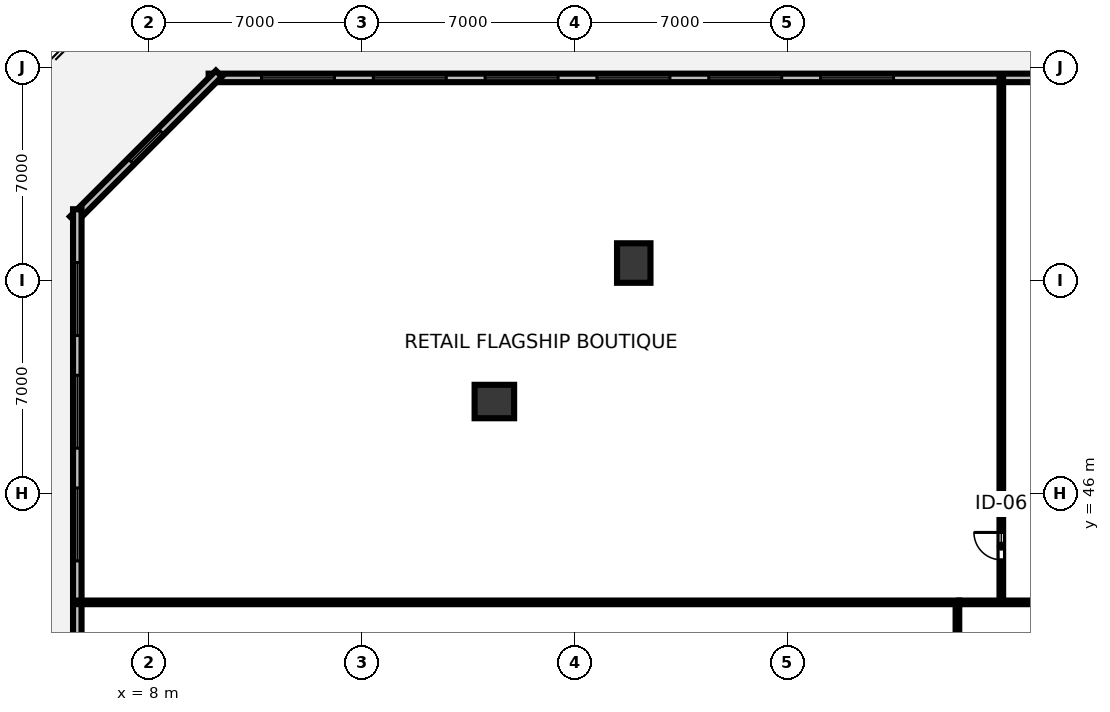
"""IFC4 building model, lengths in metres.
Left out: names, types, materials, properties, quantities, classifications, styles, units other than length and angle.
Written with IfcOpenShell. Run it as: python <this file> out.ifc"""

import sys

from ifc_helpers import new_model, si_unit, direction, frame, frame_2d, origin, origin_2d, place, context, subcontext, project, spatial, rectangle, hollow_rectangle, extrude, element, fill, save


model = new_model("IFC4")
c1 = context("Model", 3, precision=1e-05, world=origin(), true_north=direction((0.0, 1.0)))
c2 = subcontext(c1, "Body", "Model", "MODEL_VIEW")
j1 = project(units=[si_unit("LENGTHUNIT", "METRE"), si_unit("PLANEANGLEUNIT", "RADIAN")], contexts=[c1])
p1 = place(None, origin())
s1 = spatial("IfcSite", under=j1, at=p1, CompositionType="ELEMENT")
p2 = place(p1, origin())
s2 = spatial("IfcBuilding", under=s1, at=p2, CompositionType="ELEMENT")
p3 = place(p2, frame((0.0, 0.0, 5.0)))
s3 = spatial("IfcBuildingStorey", under=s2, at=p3, CompositionType="ELEMENT", Elevation=5.0)
for number, where, z_axis, x_axis in (
    (1, (23.943, 53.571, 0.0), (0.0, 0.0, 1.0), (1.0, 0.0, 0.0)),
    (2, (19.358, 49.016, 0.0), (0.0, 0.0, 1.0), (0.0, 1.0, 0.0)),
):
    element("IfcColumn", number, at=place(p3, frame(where, z_axis=z_axis, x_axis=x_axis)), inside=s3, PredefinedType="COLUMN", context=c2, shape_type="SweptSolid", body=[
        extrude(hollow_rectangle(XDim=1.1, YDim=1.3, WallThickness=0.07, at=origin_2d()), origin(), (0.0, 0.0, 1.0), 4.218),
    ])
p4 = place(p3, frame((82.04, 59.66, 0.0), z_axis=(0.0, 0.0, 1.0), x_axis=(-1.0, 0.0, 0.0)))
e3 = element("IfcWall", 3, at=p4, inside=s3, PredefinedType="STANDARD", context=c2, shape_type="SweptSolid", body=[
    extrude(rectangle(XDim=72.08, YDim=0.28, at=frame_2d((36.04, 0.0))), origin(), (0.0, 0.0, 1.0), 4.22),
])
p5 = place(p4, frame((1.739, 0.0, 0.85)))
e4 = element("IfcOpeningElement", 4, at=p5, cuts=e3, PredefinedType="OPENING", context=c2, shape_type="SweptSolid", body=[
    extrude(rectangle(XDim=2.4, YDim=2.4, at=frame_2d((1.2, 1.2))), frame((0.0, 0.15, 0.0), z_axis=(0.0, -1.0, 0.0), x_axis=(1.0, 0.0, 0.0)), (0.0, 0.0, 1.0), 0.3),
])
p6 = place(p4, frame((5.417, 0.0, 0.85)))
e5 = element("IfcOpeningElement", 5, at=p6, cuts=e3, PredefinedType="OPENING", context=c2, shape_type="SweptSolid", body=[
    extrude(rectangle(XDim=2.4, YDim=2.4, at=frame_2d((1.2, 1.2))), frame((0.0, 0.15, 0.0), z_axis=(0.0, -1.0, 0.0), x_axis=(1.0, 0.0, 0.0)), (0.0, 0.0, 1.0), 0.3),
])
p7 = place(p4, frame((9.095, 0.0, 0.85)))
e6 = element("IfcOpeningElement", 6, at=p7, cuts=e3, PredefinedType="OPENING", context=c2, shape_type="SweptSolid", body=[
    extrude(rectangle(XDim=2.4, YDim=2.4, at=frame_2d((1.2, 1.2))), frame((0.0, 0.15, 0.0), z_axis=(0.0, -1.0, 0.0), x_axis=(1.0, 0.0, 0.0)), (0.0, 0.0, 1.0), 0.3),
])
p8 = place(p4, frame((12.773, 0.0, 0.85)))
e7 = element("IfcOpeningElement", 7, at=p8, cuts=e3, PredefinedType="OPENING", context=c2, shape_type="SweptSolid", body=[
    extrude(rectangle(XDim=2.4, YDim=2.4, at=frame_2d((1.2, 1.2))), frame((0.0, 0.15, 0.0), z_axis=(0.0, -1.0, 0.0), x_axis=(1.0, 0.0, 0.0)), (0.0, 0.0, 1.0), 0.3),
])
p9 = place(p4, frame((16.45, 0.0, 0.85)))
e8 = element("IfcOpeningElement", 8, at=p9, cuts=e3, PredefinedType="OPENING", context=c2, shape_type="SweptSolid", body=[
    extrude(rectangle(XDim=2.4, YDim=2.4, at=frame_2d((1.2, 1.2))), frame((0.0, 0.15, 0.0), z_axis=(0.0, -1.0, 0.0), x_axis=(1.0, 0.0, 0.0)), (0.0, 0.0, 1.0), 0.3),
])
p10 = place(p4, frame((20.128, 0.0, 0.85)))
e9 = element("IfcOpeningElement", 9, at=p10, cuts=e3, PredefinedType="OPENING", context=c2, shape_type="SweptSolid", body=[
    extrude(rectangle(XDim=2.4, YDim=2.4, at=frame_2d((1.2, 1.2))), frame((0.0, 0.15, 0.0), z_axis=(0.0, -1.0, 0.0), x_axis=(1.0, 0.0, 0.0)), (0.0, 0.0, 1.0), 0.3),
])
p11 = place(p4, frame((23.806, 0.0, 0.85)))
e10 = element("IfcOpeningElement", 10, at=p11, cuts=e3, PredefinedType="OPENING", context=c2, shape_type="SweptSolid", body=[
    extrude(rectangle(XDim=2.4, YDim=2.4, at=frame_2d((1.2, 1.2))), frame((0.0, 0.15, 0.0), z_axis=(0.0, -1.0, 0.0), x_axis=(1.0, 0.0, 0.0)), (0.0, 0.0, 1.0), 0.3),
])
p12 = place(p4, frame((27.484, 0.0, 0.85)))
e11 = element("IfcOpeningElement", 11, at=p12, cuts=e3, PredefinedType="OPENING", context=c2, shape_type="SweptSolid", body=[
    extrude(rectangle(XDim=2.4, YDim=2.4, at=frame_2d((1.2, 1.2))), frame((0.0, 0.15, 0.0), z_axis=(0.0, -1.0, 0.0), x_axis=(1.0, 0.0, 0.0)), (0.0, 0.0, 1.0), 0.3),
])
p13 = place(p4, frame((31.162, 0.0, 0.85)))
e12 = element("IfcOpeningElement", 12, at=p13, cuts=e3, PredefinedType="OPENING", context=c2, shape_type="SweptSolid", body=[
    extrude(rectangle(XDim=2.4, YDim=2.4, at=frame_2d((1.2, 1.2))), frame((0.0, 0.15, 0.0), z_axis=(0.0, -1.0, 0.0), x_axis=(1.0, 0.0, 0.0)), (0.0, 0.0, 1.0), 0.3),
])
p14 = place(p4, frame((34.84, 0.0, 0.85)))
e13 = element("IfcOpeningElement", 13, at=p14, cuts=e3, PredefinedType="OPENING", context=c2, shape_type="SweptSolid", body=[
    extrude(rectangle(XDim=2.4, YDim=2.4, at=frame_2d((1.2, 1.2))), frame((0.0, 0.15, 0.0), z_axis=(0.0, -1.0, 0.0), x_axis=(1.0, 0.0, 0.0)), (0.0, 0.0, 1.0), 0.3),
])
p15 = place(p4, frame((38.518, 0.0, 0.85)))
e14 = element("IfcOpeningElement", 14, at=p15, cuts=e3, PredefinedType="OPENING", context=c2, shape_type="SweptSolid", body=[
    extrude(rectangle(XDim=2.4, YDim=2.4, at=frame_2d((1.2, 1.2))), frame((0.0, 0.15, 0.0), z_axis=(0.0, -1.0, 0.0), x_axis=(1.0, 0.0, 0.0)), (0.0, 0.0, 1.0), 0.3),
])
p16 = place(p4, frame((42.196, 0.0, 0.85)))
e15 = element("IfcOpeningElement", 15, at=p16, cuts=e3, PredefinedType="OPENING", context=c2, shape_type="SweptSolid", body=[
    extrude(rectangle(XDim=2.4, YDim=2.4, at=frame_2d((1.2, 1.2))), frame((0.0, 0.15, 0.0), z_axis=(0.0, -1.0, 0.0), x_axis=(1.0, 0.0, 0.0)), (0.0, 0.0, 1.0), 0.3),
])
p17 = place(p4, frame((49.552, 0.0, 0.85)))
e16 = element("IfcOpeningElement", 16, at=p17, cuts=e3, PredefinedType="OPENING", context=c2, shape_type="SweptSolid", body=[
    extrude(rectangle(XDim=2.4, YDim=2.4, at=frame_2d((1.2, 1.2))), frame((0.0, 0.15, 0.0), z_axis=(0.0, -1.0, 0.0), x_axis=(1.0, 0.0, 0.0)), (0.0, 0.0, 1.0), 0.3),
])
p18 = place(p4, frame((53.229, 0.0, 0.85)))
e17 = element("IfcOpeningElement", 17, at=p18, cuts=e3, PredefinedType="OPENING", context=c2, shape_type="SweptSolid", body=[
    extrude(rectangle(XDim=2.4, YDim=2.4, at=frame_2d((1.2, 1.2))), frame((0.0, 0.15, 0.0), z_axis=(0.0, -1.0, 0.0), x_axis=(1.0, 0.0, 0.0)), (0.0, 0.0, 1.0), 0.3),
])
p19 = place(p4, frame((56.907, 0.0, 0.85)))
e18 = element("IfcOpeningElement", 18, at=p19, cuts=e3, PredefinedType="OPENING", context=c2, shape_type="SweptSolid", body=[
    extrude(rectangle(XDim=2.4, YDim=2.4, at=frame_2d((1.2, 1.2))), frame((0.0, 0.15, 0.0), z_axis=(0.0, -1.0, 0.0), x_axis=(1.0, 0.0, 0.0)), (0.0, 0.0, 1.0), 0.3),
])
p20 = place(p4, frame((60.585, 0.0, 0.85)))
e19 = element("IfcOpeningElement", 19, at=p20, cuts=e3, PredefinedType="OPENING", context=c2, shape_type="SweptSolid", body=[
    extrude(rectangle(XDim=2.4, YDim=2.4, at=frame_2d((1.2, 1.2))), frame((0.0, 0.15, 0.0), z_axis=(0.0, -1.0, 0.0), x_axis=(1.0, 0.0, 0.0)), (0.0, 0.0, 1.0), 0.3),
])
p21 = place(p4, frame((64.263, 0.0, 0.85)))
e20 = element("IfcOpeningElement", 20, at=p21, cuts=e3, PredefinedType="OPENING", context=c2, shape_type="SweptSolid", body=[
    extrude(rectangle(XDim=2.4, YDim=2.4, at=frame_2d((1.2, 1.2))), frame((0.0, 0.15, 0.0), z_axis=(0.0, -1.0, 0.0), x_axis=(1.0, 0.0, 0.0)), (0.0, 0.0, 1.0), 0.3),
])
p22 = place(p4, frame((67.941, 0.0, 0.85)))
e21 = element("IfcOpeningElement", 21, at=p22, cuts=e3, PredefinedType="OPENING", context=c2, shape_type="SweptSolid", body=[
    extrude(rectangle(XDim=2.4, YDim=2.4, at=frame_2d((1.2, 1.2))), frame((0.0, 0.15, 0.0), z_axis=(0.0, -1.0, 0.0), x_axis=(1.0, 0.0, 0.0)), (0.0, 0.0, 1.0), 0.3),
])
p23 = place(p3, frame((10.298, 59.8, 0.0), z_axis=(0.0, 0.0, 1.0), x_axis=(-0.707106781187, -0.707106781187, 0.0)))
e22 = element("IfcWall", 22, at=p23, inside=s3, PredefinedType="STANDARD", context=c2, shape_type="SweptSolid", body=[
    extrude(rectangle(XDim=6.786, YDim=0.28, at=frame_2d((3.393, 0.0))), origin(), (0.0, 0.0, 1.0), 4.22),
])
p24 = place(p23, frame((2.693, 0.0, 1.5)))
e23 = element("IfcOpeningElement", 23, at=p24, cuts=e22, PredefinedType="OPENING", context=c2, shape_type="SweptSolid", body=[
    extrude(rectangle(XDim=1.4, YDim=1.2, at=frame_2d((0.7, 0.6))), frame((0.0, 0.15, 0.0), z_axis=(0.0, -1.0, 0.0), x_axis=(1.0, 0.0, 0.0)), (0.0, 0.0, 1.0), 0.3),
])
p25 = place(p3, frame((5.64, 55.34, 0.0), z_axis=(0.0, 0.0, 1.0), x_axis=(0.0, -1.0, 0.0)))
e24 = element("IfcWall", 24, at=p25, inside=s3, PredefinedType="STANDARD", context=c2, shape_type="SweptSolid", body=[
    extrude(rectangle(XDim=46.68, YDim=0.28, at=frame_2d((23.34, 0.0))), origin(), (0.0, 0.0, 1.0), 4.22),
])
p26 = place(p25, frame((27.74, 0.0, 0.0)))
e25 = element("IfcOpeningElement", 25, at=p26, cuts=e24, PredefinedType="OPENING", context=c2, shape_type="SweptSolid", body=[
    extrude(rectangle(XDim=1.6, YDim=2.15, at=frame_2d((0.8, 1.075))), frame((0.0, 0.15, 0.0), z_axis=(0.0, -1.0, 0.0), x_axis=(1.0, 0.0, 0.0)), (0.0, 0.0, 1.0), 0.3),
])
p27 = place(p25, frame((1.753, 0.0, 0.85)))
e26 = element("IfcOpeningElement", 26, at=p27, cuts=e24, PredefinedType="OPENING", context=c2, shape_type="SweptSolid", body=[
    extrude(rectangle(XDim=2.4, YDim=2.4, at=frame_2d((1.2, 1.2))), frame((0.0, 0.15, 0.0), z_axis=(0.0, -1.0, 0.0), x_axis=(1.0, 0.0, 0.0)), (0.0, 0.0, 1.0), 0.3),
])
p28 = place(p25, frame((5.46, 0.0, 0.85)))
e27 = element("IfcOpeningElement", 27, at=p28, cuts=e24, PredefinedType="OPENING", context=c2, shape_type="SweptSolid", body=[
    extrude(rectangle(XDim=2.4, YDim=2.4, at=frame_2d((1.2, 1.2))), frame((0.0, 0.15, 0.0), z_axis=(0.0, -1.0, 0.0), x_axis=(1.0, 0.0, 0.0)), (0.0, 0.0, 1.0), 0.3),
])
p29 = place(p25, frame((9.167, 0.0, 0.85)))
e28 = element("IfcOpeningElement", 28, at=p29, cuts=e24, PredefinedType="OPENING", context=c2, shape_type="SweptSolid", body=[
    extrude(rectangle(XDim=2.4, YDim=2.4, at=frame_2d((1.2, 1.2))), frame((0.0, 0.15, 0.0), z_axis=(0.0, -1.0, 0.0), x_axis=(1.0, 0.0, 0.0)), (0.0, 0.0, 1.0), 0.3),
])
p30 = place(p25, frame((16.58, 0.0, 0.85)))
e29 = element("IfcOpeningElement", 29, at=p30, cuts=e24, PredefinedType="OPENING", context=c2, shape_type="SweptSolid", body=[
    extrude(rectangle(XDim=2.4, YDim=2.4, at=frame_2d((1.2, 1.2))), frame((0.0, 0.15, 0.0), z_axis=(0.0, -1.0, 0.0), x_axis=(1.0, 0.0, 0.0)), (0.0, 0.0, 1.0), 0.3),
])
p31 = place(p25, frame((20.287, 0.0, 0.85)))
e30 = element("IfcOpeningElement", 30, at=p31, cuts=e24, PredefinedType="OPENING", context=c2, shape_type="SweptSolid", body=[
    extrude(rectangle(XDim=2.4, YDim=2.4, at=frame_2d((1.2, 1.2))), frame((0.0, 0.15, 0.0), z_axis=(0.0, -1.0, 0.0), x_axis=(1.0, 0.0, 0.0)), (0.0, 0.0, 1.0), 0.3),
])
p32 = place(p25, frame((23.993, 0.0, 0.85)))
e31 = element("IfcOpeningElement", 31, at=p32, cuts=e24, PredefinedType="OPENING", context=c2, shape_type="SweptSolid", body=[
    extrude(rectangle(XDim=2.4, YDim=2.4, at=frame_2d((1.2, 1.2))), frame((0.0, 0.15, 0.0), z_axis=(0.0, -1.0, 0.0), x_axis=(1.0, 0.0, 0.0)), (0.0, 0.0, 1.0), 0.3),
])
p33 = place(p25, frame((35.113, 0.0, 0.85)))
e32 = element("IfcOpeningElement", 32, at=p33, cuts=e24, PredefinedType="OPENING", context=c2, shape_type="SweptSolid", body=[
    extrude(rectangle(XDim=2.4, YDim=2.4, at=frame_2d((1.2, 1.2))), frame((0.0, 0.15, 0.0), z_axis=(0.0, -1.0, 0.0), x_axis=(1.0, 0.0, 0.0)), (0.0, 0.0, 1.0), 0.3),
])
p34 = place(p25, frame((38.82, 0.0, 0.85)))
e33 = element("IfcOpeningElement", 33, at=p34, cuts=e24, PredefinedType="OPENING", context=c2, shape_type="SweptSolid", body=[
    extrude(rectangle(XDim=2.4, YDim=2.4, at=frame_2d((1.2, 1.2))), frame((0.0, 0.15, 0.0), z_axis=(0.0, -1.0, 0.0), x_axis=(1.0, 0.0, 0.0)), (0.0, 0.0, 1.0), 0.3),
])
p35 = place(p25, frame((42.527, 0.0, 0.85)))
e34 = element("IfcOpeningElement", 34, at=p35, cuts=e24, PredefinedType="OPENING", context=c2, shape_type="SweptSolid", body=[
    extrude(rectangle(XDim=2.4, YDim=2.4, at=frame_2d((1.2, 1.2))), frame((0.0, 0.15, 0.0), z_axis=(0.0, -1.0, 0.0), x_axis=(1.0, 0.0, 0.0)), (0.0, 0.0, 1.0), 0.3),
])
p36 = place(p3, frame((36.034, 42.41, 0.0), z_axis=(0.0, 0.0, 1.0), x_axis=(0.0, 1.0, 0.0)))
e35 = element("IfcWall", 35, at=p36, inside=s3, PredefinedType="PARTITIONING", context=c2, shape_type="SweptSolid", body=[
    extrude(rectangle(XDim=17.25, YDim=0.12, at=frame_2d((8.625, 0.0))), origin(), (0.0, 0.0, 1.0), 3.32),
])
p37 = place(p36, frame((1.4, 0.0, 0.0)))
e36 = element("IfcOpeningElement", 36, at=p37, cuts=e35, PredefinedType="OPENING", context=c2, shape_type="SweptSolid", body=[
    extrude(rectangle(XDim=0.9, YDim=2.15, at=frame_2d((0.45, 1.075))), frame((0.0, 0.07, 0.0), z_axis=(0.0, -1.0, 0.0), x_axis=(1.0, 0.0, 0.0)), (0.0, 0.0, 1.0), 0.14),
])
p38 = place(p3, frame((34.65, 42.41, 0.0), z_axis=(0.0, 0.0, 1.0), x_axis=(1.0, 0.0, 0.0)))
e37 = element("IfcWall", 37, at=p38, inside=s3, PredefinedType="PARTITIONING", context=c2, shape_type="SweptSolid", body=[
    extrude(rectangle(XDim=22.7, YDim=0.12, at=frame_2d((11.35, 0.0))), origin(), (0.0, 0.0, 1.0), 3.32),
])
p39 = place(p38, frame((11.497, 0.0, 0.0)))
e38 = element("IfcOpeningElement", 38, at=p39, cuts=e37, PredefinedType="OPENING", context=c2, shape_type="SweptSolid", body=[
    extrude(rectangle(XDim=0.95, YDim=2.15, at=frame_2d((0.475, 1.075))), frame((0.0, 0.07, 0.0), z_axis=(0.0, -1.0, 0.0), x_axis=(1.0, 0.0, 0.0)), (0.0, 0.0, 1.0), 0.14),
])
p40 = place(p3, frame((34.59, 21.65, 0.0), z_axis=(0.0, 0.0, 1.0), x_axis=(0.0, 1.0, 0.0)))
e39 = element("IfcWall", 39, at=p40, inside=s3, PredefinedType="PARTITIONING", context=c2, shape_type="SweptSolid", body=[
    extrude(rectangle(XDim=20.7, YDim=0.12, at=frame_2d((10.35, 0.0))), origin(), (0.0, 0.0, 1.0), 3.32),
])
p41 = place(p40, frame((9.875, 0.0, 0.0)))
e40 = element("IfcOpeningElement", 40, at=p41, cuts=e39, PredefinedType="OPENING", context=c2, shape_type="SweptSolid", body=[
    extrude(rectangle(XDim=0.95, YDim=2.15, at=frame_2d((0.475, 1.075))), frame((0.0, 0.07, 0.0), z_axis=(0.0, -1.0, 0.0), x_axis=(1.0, 0.0, 0.0)), (0.0, 0.0, 1.0), 0.14),
])
p42 = place(p3, frame((34.65, 42.41, 0.0), z_axis=(0.0, 0.0, 1.0), x_axis=(-1.0, 0.0, 0.0)))
e41 = element("IfcWall", 41, at=p42, inside=s3, PredefinedType="PARTITIONING", context=c2, shape_type="SweptSolid", body=[
    extrude(rectangle(XDim=29.01, YDim=0.12, at=frame_2d((14.505, 0.0))), origin(), (0.0, 0.0, 1.0), 3.32),
])
p43 = place(p17, origin())
e42 = element("IfcWindow", 42, at=p43, inside=s3, PartitioningType="SINGLE_PANEL", PredefinedType="WINDOW", context=c2, shape_type="SweptSolid", body=[
    extrude(rectangle(XDim=2.4, YDim=2.4, at=frame_2d((1.2, 1.2))), frame((0.0, 0.03, 0.0), z_axis=(0.0, -1.0, 0.0), x_axis=(1.0, 0.0, 0.0)), (0.0, 0.0, 1.0), 0.06),
])
fill(e16, e42)
p44 = place(p18, origin())
e43 = element("IfcWindow", 43, at=p44, inside=s3, PartitioningType="SINGLE_PANEL", PredefinedType="WINDOW", context=c2, shape_type="SweptSolid", body=[
    extrude(rectangle(XDim=2.4, YDim=2.4, at=frame_2d((1.2, 1.2))), frame((0.0, 0.03, 0.0), z_axis=(0.0, -1.0, 0.0), x_axis=(1.0, 0.0, 0.0)), (0.0, 0.0, 1.0), 0.06),
])
fill(e17, e43)
p45 = place(p19, origin())
e44 = element("IfcWindow", 44, at=p45, inside=s3, PartitioningType="SINGLE_PANEL", PredefinedType="WINDOW", context=c2, shape_type="SweptSolid", body=[
    extrude(rectangle(XDim=2.4, YDim=2.4, at=frame_2d((1.2, 1.2))), frame((0.0, 0.03, 0.0), z_axis=(0.0, -1.0, 0.0), x_axis=(1.0, 0.0, 0.0)), (0.0, 0.0, 1.0), 0.06),
])
fill(e18, e44)
p46 = place(p20, origin())
e45 = element("IfcWindow", 45, at=p46, inside=s3, PartitioningType="SINGLE_PANEL", PredefinedType="WINDOW", context=c2, shape_type="SweptSolid", body=[
    extrude(rectangle(XDim=2.4, YDim=2.4, at=frame_2d((1.2, 1.2))), frame((0.0, 0.03, 0.0), z_axis=(0.0, -1.0, 0.0), x_axis=(1.0, 0.0, 0.0)), (0.0, 0.0, 1.0), 0.06),
])
fill(e19, e45)
p47 = place(p21, origin())
e46 = element("IfcWindow", 46, at=p47, inside=s3, PartitioningType="SINGLE_PANEL", PredefinedType="WINDOW", context=c2, shape_type="SweptSolid", body=[
    extrude(rectangle(XDim=2.4, YDim=2.4, at=frame_2d((1.2, 1.2))), frame((0.0, 0.03, 0.0), z_axis=(0.0, -1.0, 0.0), x_axis=(1.0, 0.0, 0.0)), (0.0, 0.0, 1.0), 0.06),
])
fill(e20, e46)
p48 = place(p22, origin())
e47 = element("IfcWindow", 47, at=p48, inside=s3, PartitioningType="SINGLE_PANEL", PredefinedType="WINDOW", context=c2, shape_type="SweptSolid", body=[
    extrude(rectangle(XDim=2.4, YDim=2.4, at=frame_2d((1.2, 1.2))), frame((0.0, 0.03, 0.0), z_axis=(0.0, -1.0, 0.0), x_axis=(1.0, 0.0, 0.0)), (0.0, 0.0, 1.0), 0.06),
])
fill(e21, e47)
p49 = place(p24, origin())
e48 = element("IfcWindow", 48, at=p49, inside=s3, PartitioningType="SINGLE_PANEL", PredefinedType="WINDOW", context=c2, shape_type="SweptSolid", body=[
    extrude(rectangle(XDim=1.4, YDim=1.2, at=frame_2d((0.7, 0.6))), frame((0.0, 0.03, 0.0), z_axis=(0.0, -1.0, 0.0), x_axis=(1.0, 0.0, 0.0)), (0.0, 0.0, 1.0), 0.06),
])
fill(e23, e48)
p50 = place(p27, origin())
e49 = element("IfcWindow", 49, at=p50, inside=s3, PartitioningType="SINGLE_PANEL", PredefinedType="WINDOW", context=c2, shape_type="SweptSolid", body=[
    extrude(rectangle(XDim=2.4, YDim=2.4, at=frame_2d((1.2, 1.2))), frame((0.0, 0.03, 0.0), z_axis=(0.0, -1.0, 0.0), x_axis=(1.0, 0.0, 0.0)), (0.0, 0.0, 1.0), 0.06),
])
fill(e26, e49)
p51 = place(p28, origin())
e50 = element("IfcWindow", 50, at=p51, inside=s3, PartitioningType="SINGLE_PANEL", PredefinedType="WINDOW", context=c2, shape_type="SweptSolid", body=[
    extrude(rectangle(XDim=2.4, YDim=2.4, at=frame_2d((1.2, 1.2))), frame((0.0, 0.03, 0.0), z_axis=(0.0, -1.0, 0.0), x_axis=(1.0, 0.0, 0.0)), (0.0, 0.0, 1.0), 0.06),
])
fill(e27, e50)
p52 = place(p29, origin())
e51 = element("IfcWindow", 51, at=p52, inside=s3, PartitioningType="SINGLE_PANEL", PredefinedType="WINDOW", context=c2, shape_type="SweptSolid", body=[
    extrude(rectangle(XDim=2.4, YDim=2.4, at=frame_2d((1.2, 1.2))), frame((0.0, 0.03, 0.0), z_axis=(0.0, -1.0, 0.0), x_axis=(1.0, 0.0, 0.0)), (0.0, 0.0, 1.0), 0.06),
])
fill(e28, e51)
p53 = place(p37, origin())
e52 = element("IfcDoor", 52, at=p53, inside=s3, OperationType="SINGLE_SWING_RIGHT", PredefinedType="DOOR", context=c2, shape_type="SweptSolid", body=[
    extrude(rectangle(XDim=0.9, YDim=2.15, at=frame_2d((0.45, 1.075))), frame((0.0, 0.025, 0.0), z_axis=(0.0, -1.0, 0.0), x_axis=(1.0, 0.0, 0.0)), (0.0, 0.0, 1.0), 0.05),
])
fill(e36, e52)
save(model, sys.argv[1])
